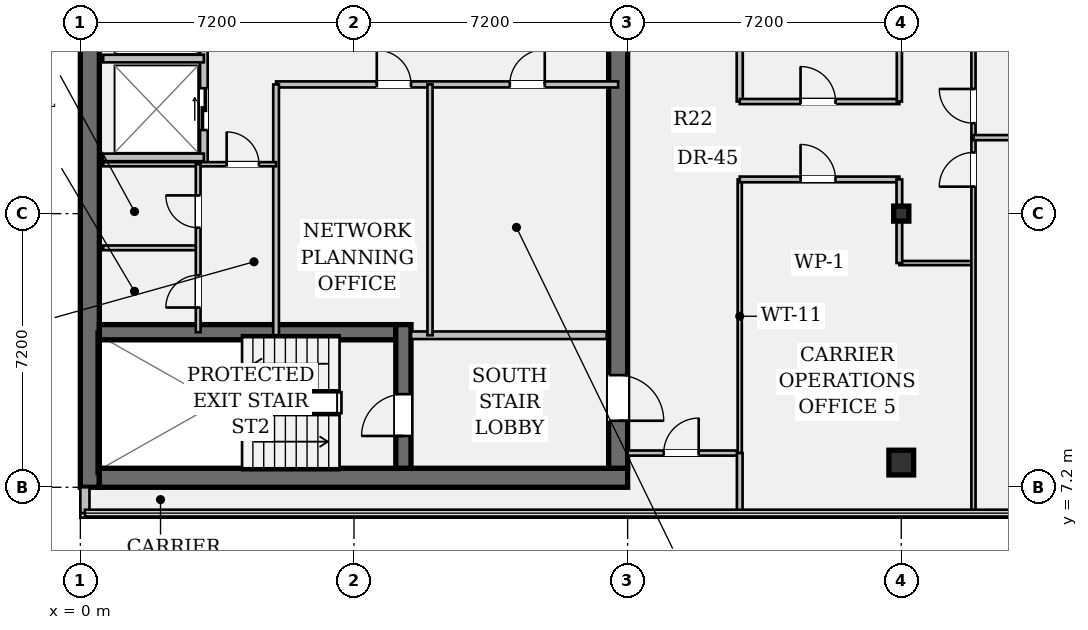
"""IFC4 building model, lengths in metres.
Left out: names, types, materials, properties, quantities, classifications, styles, units other than length and angle.
Written with IfcOpenShell. Run it as: python <this file> out.ifc"""

import sys

from ifc_helpers import new_model, si_unit, direction, frame, frame_2d, origin, origin_2d, place, context, subcontext, project, spatial, rectangle, hollow_rectangle, i_section, extrude, element, fill, save


model = new_model("IFC4")
c1 = context("Model", 3, precision=1e-05, world=origin(), true_north=direction((0.0, 1.0)))
c2 = subcontext(c1, "Body", "Model", "MODEL_VIEW")
j1 = project(units=[si_unit("LENGTHUNIT", "METRE"), si_unit("PLANEANGLEUNIT", "RADIAN")], contexts=[c1])
p1 = place(None, origin())
s1 = spatial("IfcSite", under=j1, at=p1, CompositionType="ELEMENT")
p2 = place(p1, origin())
s2 = spatial("IfcBuilding", under=s1, at=p2, CompositionType="ELEMENT")
p3 = place(p2, frame((0.0, 0.0, 258.65)))
s3 = spatial("IfcBuildingStorey", under=s2, at=p3, CompositionType="ELEMENT", Elevation=258.65)
p4 = place(p3, frame((0.25, 7.2, 0.0), z_axis=(0.0, 0.0, 1.0), x_axis=(0.0, 1.0, 0.0)))
e1 = element("IfcWall", 1, at=p4, inside=s3, PredefinedType="SHEAR", context=c2, shape_type="SweptSolid", body=[
    extrude(rectangle(XDim=28.8, YDim=0.5, at=frame_2d((14.4, 0.0))), origin(), (0.0, 0.0, 1.0), 3.24),
])
p5 = place(p3, frame((0.5, 7.45, 0.0), z_axis=(0.0, 0.0, 1.0), x_axis=(1.0, 0.0, 0.0)))
e2 = element("IfcWall", 2, at=p5, inside=s3, PredefinedType="SHEAR", context=c2, shape_type="SweptSolid", body=[
    extrude(rectangle(XDim=13.9, YDim=0.5, at=frame_2d((6.95, 0.0))), origin(), (0.0, 0.0, 1.0), 3.24),
])
p6 = place(p3, frame((14.15, 35.5, 0.0), z_axis=(0.0, 0.0, 1.0), x_axis=(0.0, -1.0, 0.0)))
e3 = element("IfcWall", 3, at=p6, inside=s3, PredefinedType="SHEAR", context=c2, shape_type="SweptSolid", body=[
    extrude(rectangle(XDim=27.8, YDim=0.5, at=frame_2d((13.9, 0.0))), origin(), (0.0, 0.0, 1.0), 3.24),
])
p7 = place(p6, frame((1.4, 0.0, 0.0)))
e4 = element("IfcOpeningElement", 4, at=p7, cuts=e3, PredefinedType="OPENING", context=c2, shape_type="SweptSolid", body=[
    extrude(rectangle(XDim=1.2, YDim=2.15, at=frame_2d((0.6, 1.075))), frame((0.0, 0.262, 0.0), z_axis=(0.0, -1.0, 0.0), x_axis=(1.0, 0.0, 0.0)), (0.0, 0.0, 1.0), 0.524),
])
p8 = place(p6, frame((25.35, 0.0, 0.0)))
e5 = element("IfcOpeningElement", 5, at=p8, cuts=e3, PredefinedType="OPENING", context=c2, shape_type="SweptSolid", body=[
    extrude(rectangle(XDim=1.2, YDim=2.15, at=frame_2d((0.6, 1.075))), frame((0.0, 0.262, 0.0), z_axis=(0.0, -1.0, 0.0), x_axis=(1.0, 0.0, 0.0)), (0.0, 0.0, 1.0), 0.524),
])
p9 = place(p6, frame((14.7, 0.0, 0.0)))
e6 = element("IfcOpeningElement", 6, at=p9, cuts=e3, PredefinedType="OPENING", context=c2, shape_type="SweptSolid", body=[
    extrude(rectangle(XDim=1.6, YDim=2.2, at=frame_2d((0.8, 1.1))), frame((0.0, 0.262, 0.0), z_axis=(0.0, -1.0, 0.0), x_axis=(1.0, 0.0, 0.0)), (0.0, 0.0, 1.0), 0.524),
])
p10 = place(p3, frame((0.5, 11.28, 0.0), z_axis=(0.0, 0.0, 1.0), x_axis=(1.0, 0.0, 0.0)))
e7 = element("IfcWall", 7, at=p10, inside=s3, PredefinedType="SHEAR", context=c2, shape_type="SweptSolid", body=[
    extrude(rectangle(XDim=7.8, YDim=0.4, at=frame_2d((3.9, 0.0))), origin(), (0.0, 0.0, 1.0), 3.24),
])
p11 = place(p3, frame((8.5, 7.7, 0.0), z_axis=(0.0, 0.0, 1.0), x_axis=(0.0, 1.0, 0.0)))
e8 = element("IfcWall", 8, at=p11, inside=s3, PredefinedType="SHEAR", context=c2, shape_type="SweptSolid", body=[
    extrude(rectangle(XDim=3.78, YDim=0.4, at=frame_2d((1.89, 0.0))), origin(), (0.0, 0.0, 1.0), 3.24),
])
p12 = place(p11, frame((0.85, 0.0, 0.0)))
e9 = element("IfcOpeningElement", 9, at=p12, cuts=e8, PredefinedType="OPENING", context=c2, shape_type="SweptSolid", body=[
    extrude(rectangle(XDim=1.1, YDim=2.15, at=frame_2d((0.55, 1.075))), frame((0.0, 0.212, 0.0), z_axis=(0.0, -1.0, 0.0), x_axis=(1.0, 0.0, 0.0)), (0.0, 0.0, 1.0), 0.424),
])
p13 = place(p3, frame((21.6, 7.85, 0.0), z_axis=(0.0, 0.0, 1.0), x_axis=(1.0, 0.0, 0.0)))
e10 = element("IfcColumn", 10, at=p13, inside=s3, PredefinedType="COLUMN", context=c2, shape_type="SweptSolid", body=[
    extrude(hollow_rectangle(XDim=0.65, YDim=0.65, WallThickness=0.04, at=origin_2d()), origin(), (0.0, 0.0, 1.0), 3.24),
])
p14 = place(p3, frame((21.6, 14.4, 0.0), z_axis=(0.0, 0.0, 1.0), x_axis=(1.0, 0.0, 0.0)))
e11 = element("IfcColumn", 11, at=p14, inside=s3, PredefinedType="COLUMN", context=c2, shape_type="SweptSolid", body=[
    extrude(i_section(OverallWidth=0.399, OverallDepth=0.394, WebThickness=0.023, FlangeThickness=0.037, FilletRadius=0.018, at=origin_2d()), origin(), (0.0, 0.0, 1.0), 3.24),
])
p15 = place(p3, frame((0.12, 6.52, 0.0), z_axis=(0.0, 0.0, 1.0), x_axis=(0.0, 1.0, 0.0)))
e12 = element("IfcWall", 12, at=p15, inside=s3, PredefinedType="STANDARD", context=c2, shape_type="SweptSolid", body=[
    extrude(rectangle(XDim=0.68, YDim=0.24, at=frame_2d((0.34, 0.0))), origin(), (0.0, 0.0, 1.0), 3.24),
])
p16 = place(p3, frame((8.7, 11.2, 0.0), z_axis=(0.0, 0.0, 1.0), x_axis=(1.0, 0.0, 0.0)))
e13 = element("IfcWall", 13, at=p16, inside=s3, PredefinedType="PARTITIONING", context=c2, shape_type="SweptSolid", body=[
    extrude(rectangle(XDim=5.15, YDim=0.2, at=frame_2d((2.575, 0.0))), origin(), (0.0, 0.0, 1.0), 3.24),
])
p17 = place(p3, frame((3.25, 15.7, 0.0), z_axis=(0.0, 0.0, 1.0), x_axis=(0.0, 1.0, 0.0)))
e14 = element("IfcWall", 14, at=p17, inside=s3, PredefinedType="PARTITIONING", context=c2, shape_type="SweptSolid", body=[
    extrude(rectangle(XDim=13.08, YDim=0.2, at=frame_2d((6.54, 0.0))), origin(), (0.0, 0.0, 1.0), 3.24),
])
p18 = place(p17, frame((0.9, 0.0, 0.0)))
e15 = element("IfcOpeningElement", 15, at=p18, cuts=e14, PredefinedType="OPENING", context=c2, shape_type="SweptSolid", body=[
    extrude(rectangle(XDim=1.1, YDim=2.2, at=frame_2d((0.55, 1.1))), frame((0.0, 0.112, 0.0), z_axis=(0.0, -1.0, 0.0), x_axis=(1.0, 0.0, 0.0)), (0.0, 0.0, 1.0), 0.224),
])
p19 = place(p17, frame((3.5, 0.0, 0.0)))
e16 = element("IfcOpeningElement", 16, at=p19, cuts=e14, PredefinedType="OPENING", context=c2, shape_type="SweptSolid", body=[
    extrude(rectangle(XDim=1.1, YDim=2.2, at=frame_2d((0.55, 1.1))), frame((0.0, 0.112, 0.0), z_axis=(0.0, -1.0, 0.0), x_axis=(1.0, 0.0, 0.0)), (0.0, 0.0, 1.0), 0.224),
])
p20 = place(p17, frame((7.2, 0.0, 0.0)))
e17 = element("IfcOpeningElement", 17, at=p20, cuts=e14, PredefinedType="OPENING", context=c2, shape_type="SweptSolid", body=[
    extrude(rectangle(XDim=1.1, YDim=2.2, at=frame_2d((0.55, 1.1))), frame((0.0, 0.112, 0.0), z_axis=(0.0, -1.0, 0.0), x_axis=(1.0, 0.0, 0.0)), (0.0, 0.0, 1.0), 0.224),
])
p21 = place(p17, frame((9.8, 0.0, 0.0)))
e18 = element("IfcOpeningElement", 18, at=p21, cuts=e14, PredefinedType="OPENING", context=c2, shape_type="SweptSolid", body=[
    extrude(rectangle(XDim=1.1, YDim=2.2, at=frame_2d((0.55, 1.1))), frame((0.0, 0.112, 0.0), z_axis=(0.0, -1.0, 0.0), x_axis=(1.0, 0.0, 0.0)), (0.0, 0.0, 1.0), 0.224),
])
for number, where, z_axis, x_axis in (
    (19, (0.6, 15.88, 0.0), (0.0, 0.0, 1.0), (1.0, 0.0, 0.0)),
    (20, (0.6, 18.48, 0.0), (0.0, 0.0, 1.0), (1.0, 0.0, 0.0)),
):
    element("IfcWall", number, at=place(p3, frame(where, z_axis=z_axis, x_axis=x_axis)), inside=s3, PredefinedType="PARTITIONING", context=c2, shape_type="SweptSolid", body=[
        extrude(rectangle(XDim=2.65, YDim=0.2, at=frame_2d((1.325, 0.0))), origin(), (0.0, 0.0, 1.0), 3.24),
    ])
p22 = place(p3, frame((5.15, 17.8, 0.0), z_axis=(0.0, 0.0, 1.0), x_axis=(1.0, 0.0, 0.0)))
e21 = element("IfcWall", 21, at=p22, inside=s3, PredefinedType="PARTITIONING", context=c2, shape_type="SweptSolid", body=[
    extrude(rectangle(XDim=9.0, YDim=0.16, at=frame_2d((4.5, 0.0))), origin(), (0.0, 0.0, 1.0), 3.24),
])
p23 = place(p22, frame((2.65, 0.0, 0.0)))
e22 = element("IfcOpeningElement", 22, at=p23, cuts=e21, PredefinedType="OPENING", context=c2, shape_type="SweptSolid", body=[
    extrude(rectangle(XDim=0.9, YDim=2.15, at=frame_2d((0.45, 1.075))), frame((0.0, 0.092, 0.0), z_axis=(0.0, -1.0, 0.0), x_axis=(1.0, 0.0, 0.0)), (0.0, 0.0, 1.0), 0.184),
])
p24 = place(p22, frame((6.15, 0.0, 0.0)))
e23 = element("IfcOpeningElement", 23, at=p24, cuts=e21, PredefinedType="OPENING", context=c2, shape_type="SweptSolid", body=[
    extrude(rectangle(XDim=0.92, YDim=2.15, at=frame_2d((0.46, 1.075))), frame((0.0, 0.092, 0.0), z_axis=(0.0, -1.0, 0.0), x_axis=(1.0, 0.0, 0.0)), (0.0, 0.0, 1.0), 0.184),
])
p25 = place(p3, frame((5.15, 11.2, 0.0), z_axis=(0.0, 0.0, 1.0), x_axis=(0.0, 1.0, 0.0)))
e24 = element("IfcWall", 24, at=p25, inside=s3, PredefinedType="PARTITIONING", context=c2, shape_type="SweptSolid", body=[
    extrude(rectangle(XDim=6.6, YDim=0.15, at=frame_2d((3.3, 0.0))), origin(), (0.0, 0.0, 1.0), 3.24),
])
p26 = place(p3, frame((9.2, 11.2, 0.0), z_axis=(0.0, 0.0, 1.0), x_axis=(0.0, 1.0, 0.0)))
e25 = element("IfcWall", 25, at=p26, inside=s3, PredefinedType="PARTITIONING", context=c2, shape_type="SweptSolid", body=[
    extrude(rectangle(XDim=6.6, YDim=0.135, at=frame_2d((3.3, 0.0))), origin(), (0.0, 0.0, 1.0), 3.24),
])
p27 = place(p3, frame((0.6, 15.7, 0.0), z_axis=(0.0, 0.0, 1.0), x_axis=(1.0, 0.0, 0.0)))
e26 = element("IfcWall", 26, at=p27, inside=s3, PredefinedType="PARTITIONING", context=c2, shape_type="SweptSolid", body=[
    extrude(rectangle(XDim=4.55, YDim=0.11, at=frame_2d((2.275, 0.0))), origin(), (0.0, 0.0, 1.0), 3.24),
])
p28 = place(p27, frame((3.25, 0.0, 0.0)))
e27 = element("IfcOpeningElement", 27, at=p28, cuts=e26, PredefinedType="OPENING", context=c2, shape_type="SweptSolid", body=[
    extrude(rectangle(XDim=0.85, YDim=2.15, at=frame_2d((0.425, 1.075))), frame((0.0, 0.067, 0.0), z_axis=(0.0, -1.0, 0.0), x_axis=(1.0, 0.0, 0.0)), (0.0, 0.0, 1.0), 0.134),
])
p29 = place(p3, frame((0.6, 13.5, 0.0), z_axis=(0.0, 0.0, 1.0), x_axis=(1.0, 0.0, 0.0)))
e28 = element("IfcWall", 28, at=p29, inside=s3, PredefinedType="PARTITIONING", context=c2, shape_type="SweptSolid", body=[
    extrude(rectangle(XDim=2.5, YDim=0.125, at=frame_2d((1.25, 0.0))), origin(), (0.0, 0.0, 1.0), 3.24),
])
p30 = place(p3, frame((3.1, 11.28, 0.0), z_axis=(0.0, 0.0, 1.0), x_axis=(0.0, 1.0, 0.0)))
e29 = element("IfcWall", 29, at=p30, inside=s3, PredefinedType="PARTITIONING", context=c2, shape_type="SweptSolid", body=[
    extrude(rectangle(XDim=4.42, YDim=0.125, at=frame_2d((2.21, 0.0))), origin(), (0.0, 0.0, 1.0), 3.24),
])
p31 = place(p30, frame((0.65, 0.0, 0.0)))
e30 = element("IfcOpeningElement", 30, at=p31, cuts=e29, PredefinedType="OPENING", context=c2, shape_type="SweptSolid", body=[
    extrude(rectangle(XDim=0.85, YDim=2.15, at=frame_2d((0.425, 1.075))), frame((0.0, 0.074, 0.0), z_axis=(0.0, -1.0, 0.0), x_axis=(1.0, 0.0, 0.0)), (0.0, 0.0, 1.0), 0.149),
])
p32 = place(p30, frame((2.75, 0.0, 0.0)))
e31 = element("IfcOpeningElement", 31, at=p32, cuts=e29, PredefinedType="OPENING", context=c2, shape_type="SweptSolid", body=[
    extrude(rectangle(XDim=0.85, YDim=2.15, at=frame_2d((0.425, 1.075))), frame((0.0, 0.074, 0.0), z_axis=(0.0, -1.0, 0.0), x_axis=(1.0, 0.0, 0.0)), (0.0, 0.0, 1.0), 0.149),
])
p33 = place(p3, frame((14.4, 8.1, 0.0), z_axis=(0.0, 0.0, 1.0), x_axis=(1.0, 0.0, 0.0)))
e32 = element("IfcWall", 32, at=p33, inside=s3, PredefinedType="PARTITIONING", context=c2, shape_type="SweptSolid", body=[
    extrude(rectangle(XDim=2.95, YDim=0.135, at=frame_2d((1.475, 0.0))), origin(), (0.0, 0.0, 1.0), 3.24),
])
p34 = place(p33, frame((0.95, 0.0, 0.0)))
e33 = element("IfcOpeningElement", 33, at=p34, cuts=e32, PredefinedType="OPENING", context=c2, shape_type="SweptSolid", body=[
    extrude(rectangle(XDim=0.92, YDim=2.15, at=frame_2d((0.46, 1.075))), frame((0.0, 0.08, 0.0), z_axis=(0.0, -1.0, 0.0), x_axis=(1.0, 0.0, 0.0)), (0.0, 0.0, 1.0), 0.159),
])
p35 = place(p3, frame((17.35, 8.1, 0.0), z_axis=(0.0, 0.0, 1.0), x_axis=(0.0, 1.0, 0.0)))
e34 = element("IfcWall", 34, at=p35, inside=s3, PredefinedType="PARTITIONING", context=c2, shape_type="SweptSolid", body=[
    extrude(rectangle(XDim=7.2, YDim=0.11, at=frame_2d((3.6, 0.0))), origin(), (0.0, 0.0, 1.0), 2.676),
])
p36 = place(p3, frame((17.35, 17.35, 0.0), z_axis=(0.0, 0.0, 1.0), x_axis=(0.0, 1.0, 0.0)))
e35 = element("IfcWall", 35, at=p36, inside=s3, PredefinedType="PARTITIONING", context=c2, shape_type="SweptSolid", body=[
    extrude(rectangle(XDim=18.55, YDim=0.16, at=frame_2d((9.275, 0.0))), origin(), (0.0, 0.0, 1.0), 2.676),
])
p37 = place(p36, frame((7.85, 0.0, 0.0)))
e36 = element("IfcOpeningElement", 36, at=p37, cuts=e35, PredefinedType="OPENING", context=c2, shape_type="SweptSolid", body=[
    extrude(rectangle(XDim=0.9, YDim=2.15, at=frame_2d((0.45, 1.075))), frame((0.0, 0.092, 0.0), z_axis=(0.0, -1.0, 0.0), x_axis=(1.0, 0.0, 0.0)), (0.0, 0.0, 1.0), 0.184),
])
p38 = place(p36, frame((10.75, 0.0, 0.0)))
e37 = element("IfcOpeningElement", 37, at=p38, cuts=e35, PredefinedType="OPENING", context=c2, shape_type="SweptSolid", body=[
    extrude(rectangle(XDim=0.9, YDim=2.15, at=frame_2d((0.45, 1.075))), frame((0.0, 0.092, 0.0), z_axis=(0.0, -1.0, 0.0), x_axis=(1.0, 0.0, 0.0)), (0.0, 0.0, 1.0), 0.184),
])
p39 = place(p36, frame((13.65, 0.0, 0.0)))
e38 = element("IfcOpeningElement", 38, at=p39, cuts=e35, PredefinedType="OPENING", context=c2, shape_type="SweptSolid", body=[
    extrude(rectangle(XDim=0.9, YDim=2.15, at=frame_2d((0.45, 1.075))), frame((0.0, 0.092, 0.0), z_axis=(0.0, -1.0, 0.0), x_axis=(1.0, 0.0, 0.0)), (0.0, 0.0, 1.0), 0.184),
])
p40 = place(p36, frame((16.55, 0.0, 0.0)))
e39 = element("IfcOpeningElement", 39, at=p40, cuts=e35, PredefinedType="OPENING", context=c2, shape_type="SweptSolid", body=[
    extrude(rectangle(XDim=0.9, YDim=2.15, at=frame_2d((0.45, 1.075))), frame((0.0, 0.092, 0.0), z_axis=(0.0, -1.0, 0.0), x_axis=(1.0, 0.0, 0.0)), (0.0, 0.0, 1.0), 0.184),
])
p41 = place(p3, frame((17.35, 15.3, 0.0), z_axis=(0.0, 0.0, 1.0), x_axis=(1.0, 0.0, 0.0)))
e40 = element("IfcWall", 40, at=p41, inside=s3, PredefinedType="PARTITIONING", context=c2, shape_type="SweptSolid", body=[
    extrude(rectangle(XDim=4.2, YDim=0.15, at=frame_2d((2.1, 0.0))), origin(), (0.0, 0.0, 1.0), 2.808),
])
p42 = place(p41, frame((1.6, 0.0, 0.0)))
e41 = element("IfcOpeningElement", 41, at=p42, cuts=e40, PredefinedType="OPENING", context=c2, shape_type="SweptSolid", body=[
    extrude(rectangle(XDim=0.92, YDim=2.15, at=frame_2d((0.46, 1.075))), frame((0.0, 0.087, 0.0), z_axis=(0.0, -1.0, 0.0), x_axis=(1.0, 0.0, 0.0)), (0.0, 0.0, 1.0), 0.174),
])
p43 = place(p3, frame((17.35, 17.35, 0.0), z_axis=(0.0, 0.0, 1.0), x_axis=(1.0, 0.0, 0.0)))
e42 = element("IfcWall", 42, at=p43, inside=s3, PredefinedType="PARTITIONING", context=c2, shape_type="SweptSolid", body=[
    extrude(rectangle(XDim=4.2, YDim=0.135, at=frame_2d((2.1, 0.0))), origin(), (0.0, 0.0, 1.0), 2.808),
])
p44 = place(p43, frame((1.6, 0.0, 0.0)))
e43 = element("IfcOpeningElement", 43, at=p44, cuts=e42, PredefinedType="OPENING", context=c2, shape_type="SweptSolid", body=[
    extrude(rectangle(XDim=0.92, YDim=2.15, at=frame_2d((0.46, 1.075))), frame((0.0, 0.08, 0.0), z_axis=(0.0, -1.0, 0.0), x_axis=(1.0, 0.0, 0.0)), (0.0, 0.0, 1.0), 0.159),
])
p45 = place(p3, frame((21.55, 13.1, 0.0), z_axis=(0.0, 0.0, 1.0), x_axis=(1.0, 0.0, 0.0)))
e44 = element("IfcWall", 44, at=p45, inside=s3, PredefinedType="PARTITIONING", context=c2, shape_type="SweptSolid", body=[
    extrude(rectangle(XDim=1.95, YDim=0.11, at=frame_2d((0.975, 0.0))), origin(), (0.0, 0.0, 1.0), 3.24),
])
p46 = place(p3, frame((21.55, 13.1, 0.0), z_axis=(0.0, 0.0, 1.0), x_axis=(0.0, 1.0, 0.0)))
e45 = element("IfcWall", 45, at=p46, inside=s3, PredefinedType="PARTITIONING", context=c2, shape_type="SweptSolid", body=[
    extrude(rectangle(XDim=2.2, YDim=0.15, at=frame_2d((1.1, 0.0))), origin(), (0.0, 0.0, 1.0), 2.676),
])
p47 = place(p3, frame((21.55, 17.35, 0.0), z_axis=(0.0, 0.0, 1.0), x_axis=(0.0, 1.0, 0.0)))
e46 = element("IfcWall", 46, at=p47, inside=s3, PredefinedType="PARTITIONING", context=c2, shape_type="SweptSolid", body=[
    extrude(rectangle(XDim=2.2, YDim=0.135, at=frame_2d((1.1, 0.0))), origin(), (0.0, 0.0, 1.0), 2.676),
])
p48 = place(p3, frame((23.5, 6.52, 0.0), z_axis=(0.0, 0.0, 1.0), x_axis=(0.0, 1.0, 0.0)))
e47 = element("IfcWall", 47, at=p48, inside=s3, PredefinedType="PARTITIONING", context=c2, shape_type="SweptSolid", body=[
    extrude(rectangle(XDim=18.56, YDim=0.11, at=frame_2d((9.28, 0.0))), origin(), (0.0, 0.0, 1.0), 2.676),
])
p49 = place(p48, frame((8.59, 0.0, 0.0)))
e48 = element("IfcOpeningElement", 48, at=p49, cuts=e47, PredefinedType="OPENING", context=c2, shape_type="SweptSolid", body=[
    extrude(rectangle(XDim=0.9, YDim=2.15, at=frame_2d((0.45, 1.075))), frame((0.0, 0.067, 0.0), z_axis=(0.0, -1.0, 0.0), x_axis=(1.0, 0.0, 0.0)), (0.0, 0.0, 1.0), 0.134),
])
p50 = place(p48, frame((10.26, 0.0, 0.0)))
e49 = element("IfcOpeningElement", 49, at=p50, cuts=e47, PredefinedType="OPENING", context=c2, shape_type="SweptSolid", body=[
    extrude(rectangle(XDim=0.9, YDim=2.15, at=frame_2d((0.45, 1.075))), frame((0.0, 0.067, 0.0), z_axis=(0.0, -1.0, 0.0), x_axis=(1.0, 0.0, 0.0)), (0.0, 0.0, 1.0), 0.134),
])
p51 = place(p3, frame((17.35, 6.52, 0.0), z_axis=(0.0, 0.0, 1.0), x_axis=(0.0, 1.0, 0.0)))
e50 = element("IfcWall", 50, at=p51, inside=s3, PredefinedType="PARTITIONING", context=c2, shape_type="SweptSolid", body=[
    extrude(rectangle(XDim=1.58, YDim=0.15, at=frame_2d((0.79, 0.0))), origin(), (0.0, 0.0, 1.0), 3.24),
])
p52 = place(p3, frame((23.5, 16.4, 0.0), z_axis=(0.0, 0.0, 1.0), x_axis=(1.0, 0.0, 0.0)))
e51 = element("IfcWall", 51, at=p52, inside=s3, PredefinedType="PARTITIONING", context=c2, shape_type="SweptSolid", body=[
    extrude(rectangle(XDim=21.98, YDim=0.135, at=frame_2d((10.99, 0.0))), origin(), (0.0, 0.0, 1.0), 2.676),
])
p53 = place(p12, origin())
e52 = element("IfcDoor", 52, at=p53, inside=s3, OperationType="SINGLE_SWING_LEFT", PredefinedType="DOOR", context=c2, shape_type="SweptSolid", body=[
    extrude(rectangle(XDim=1.1, YDim=2.15, at=frame_2d((0.55, 1.075))), frame((0.0, 0.025, 0.0), z_axis=(0.0, -1.0, 0.0), x_axis=(1.0, 0.0, 0.0)), (0.0, 0.0, 1.0), 0.05),
])
fill(e9, e52)
p54 = place(p8, origin())
e53 = element("IfcDoor", 53, at=p54, inside=s3, OperationType="SINGLE_SWING_RIGHT", PredefinedType="DOOR", context=c2, shape_type="SweptSolid", body=[
    extrude(rectangle(XDim=1.2, YDim=2.15, at=frame_2d((0.6, 1.075))), frame((0.0, 0.025, 0.0), z_axis=(0.0, -1.0, 0.0), x_axis=(1.0, 0.0, 0.0)), (0.0, 0.0, 1.0), 0.05),
])
fill(e5, e53)
p55 = place(p18, origin())
e54 = element("IfcDoor", 54, at=p55, inside=s3, OperationType="DOUBLE_DOOR_SLIDING", PredefinedType="DOOR", context=c2, shape_type="SweptSolid", body=[
    extrude(rectangle(XDim=1.1, YDim=2.2, at=frame_2d((0.55, 1.1))), frame((0.0, 0.025, 0.0), z_axis=(0.0, -1.0, 0.0), x_axis=(1.0, 0.0, 0.0)), (0.0, 0.0, 1.0), 0.05),
])
fill(e15, e54)
p56 = place(p23, origin())
e55 = element("IfcDoor", 55, at=p56, inside=s3, OperationType="SINGLE_SWING_LEFT", PredefinedType="DOOR", context=c2, shape_type="SweptSolid", body=[
    extrude(rectangle(XDim=0.9, YDim=2.15, at=frame_2d((0.45, 1.075))), frame((0.0, 0.025, 0.0), z_axis=(0.0, -1.0, 0.0), x_axis=(1.0, 0.0, 0.0)), (0.0, 0.0, 1.0), 0.05),
])
fill(e22, e55)
p57 = place(p24, origin())
e56 = element("IfcDoor", 56, at=p57, inside=s3, OperationType="SINGLE_SWING_RIGHT", PredefinedType="DOOR", context=c2, shape_type="SweptSolid", body=[
    extrude(rectangle(XDim=0.92, YDim=2.15, at=frame_2d((0.46, 1.075))), frame((0.0, 0.025, 0.0), z_axis=(0.0, -1.0, 0.0), x_axis=(1.0, 0.0, 0.0)), (0.0, 0.0, 1.0), 0.05),
])
fill(e23, e56)
p58 = place(p28, origin())
e57 = element("IfcDoor", 57, at=p58, inside=s3, OperationType="SINGLE_SWING_LEFT", PredefinedType="DOOR", context=c2, shape_type="SweptSolid", body=[
    extrude(rectangle(XDim=0.85, YDim=2.15, at=frame_2d((0.425, 1.075))), frame((0.0, 0.025, 0.0), z_axis=(0.0, -1.0, 0.0), x_axis=(1.0, 0.0, 0.0)), (0.0, 0.0, 1.0), 0.05),
])
fill(e27, e57)
p59 = place(p31, origin())
e58 = element("IfcDoor", 58, at=p59, inside=s3, OperationType="SINGLE_SWING_LEFT", PredefinedType="DOOR", context=c2, shape_type="SweptSolid", body=[
    extrude(rectangle(XDim=0.85, YDim=2.15, at=frame_2d((0.425, 1.075))), frame((0.0, 0.025, 0.0), z_axis=(0.0, -1.0, 0.0), x_axis=(1.0, 0.0, 0.0)), (0.0, 0.0, 1.0), 0.05),
])
fill(e30, e58)
p60 = place(p32, origin())
e59 = element("IfcDoor", 59, at=p60, inside=s3, OperationType="SINGLE_SWING_RIGHT", PredefinedType="DOOR", context=c2, shape_type="SweptSolid", body=[
    extrude(rectangle(XDim=0.85, YDim=2.15, at=frame_2d((0.425, 1.075))), frame((0.0, 0.025, 0.0), z_axis=(0.0, -1.0, 0.0), x_axis=(1.0, 0.0, 0.0)), (0.0, 0.0, 1.0), 0.05),
])
fill(e31, e59)
p61 = place(p44, origin())
e60 = element("IfcDoor", 60, at=p61, inside=s3, OperationType="SINGLE_SWING_LEFT", PredefinedType="DOOR", context=c2, shape_type="SweptSolid", body=[
    extrude(rectangle(XDim=0.92, YDim=2.15, at=frame_2d((0.46, 1.075))), frame((0.0, 0.025, 0.0), z_axis=(0.0, -1.0, 0.0), x_axis=(1.0, 0.0, 0.0)), (0.0, 0.0, 1.0), 0.05),
])
fill(e43, e60)
p62 = place(p34, origin())
e61 = element("IfcDoor", 61, at=p62, inside=s3, OperationType="SINGLE_SWING_RIGHT", PredefinedType="DOOR", context=c2, shape_type="SweptSolid", body=[
    extrude(rectangle(XDim=0.92, YDim=2.15, at=frame_2d((0.46, 1.075))), frame((0.0, 0.025, 0.0), z_axis=(0.0, -1.0, 0.0), x_axis=(1.0, 0.0, 0.0)), (0.0, 0.0, 1.0), 0.05),
])
fill(e33, e61)
p63 = place(p42, origin())
e62 = element("IfcDoor", 62, at=p63, inside=s3, OperationType="SINGLE_SWING_LEFT", PredefinedType="DOOR", context=c2, shape_type="SweptSolid", body=[
    extrude(rectangle(XDim=0.92, YDim=2.15, at=frame_2d((0.46, 1.075))), frame((0.0, 0.025, 0.0), z_axis=(0.0, -1.0, 0.0), x_axis=(1.0, 0.0, 0.0)), (0.0, 0.0, 1.0), 0.05),
])
fill(e41, e62)
p64 = place(p49, origin())
e63 = element("IfcDoor", 63, at=p64, inside=s3, OperationType="SINGLE_SWING_LEFT", PredefinedType="DOOR", context=c2, shape_type="SweptSolid", body=[
    extrude(rectangle(XDim=0.9, YDim=2.15, at=frame_2d((0.45, 1.075))), frame((0.0, 0.025, 0.0), z_axis=(0.0, -1.0, 0.0), x_axis=(1.0, 0.0, 0.0)), (0.0, 0.0, 1.0), 0.05),
])
fill(e48, e63)
p65 = place(p50, origin())
e64 = element("IfcDoor", 64, at=p65, inside=s3, OperationType="SINGLE_SWING_RIGHT", PredefinedType="DOOR", context=c2, shape_type="SweptSolid", body=[
    extrude(rectangle(XDim=0.9, YDim=2.15, at=frame_2d((0.45, 1.075))), frame((0.0, 0.025, 0.0), z_axis=(0.0, -1.0, 0.0), x_axis=(1.0, 0.0, 0.0)), (0.0, 0.0, 1.0), 0.05),
])
fill(e49, e64)
save(model, sys.argv[1])
